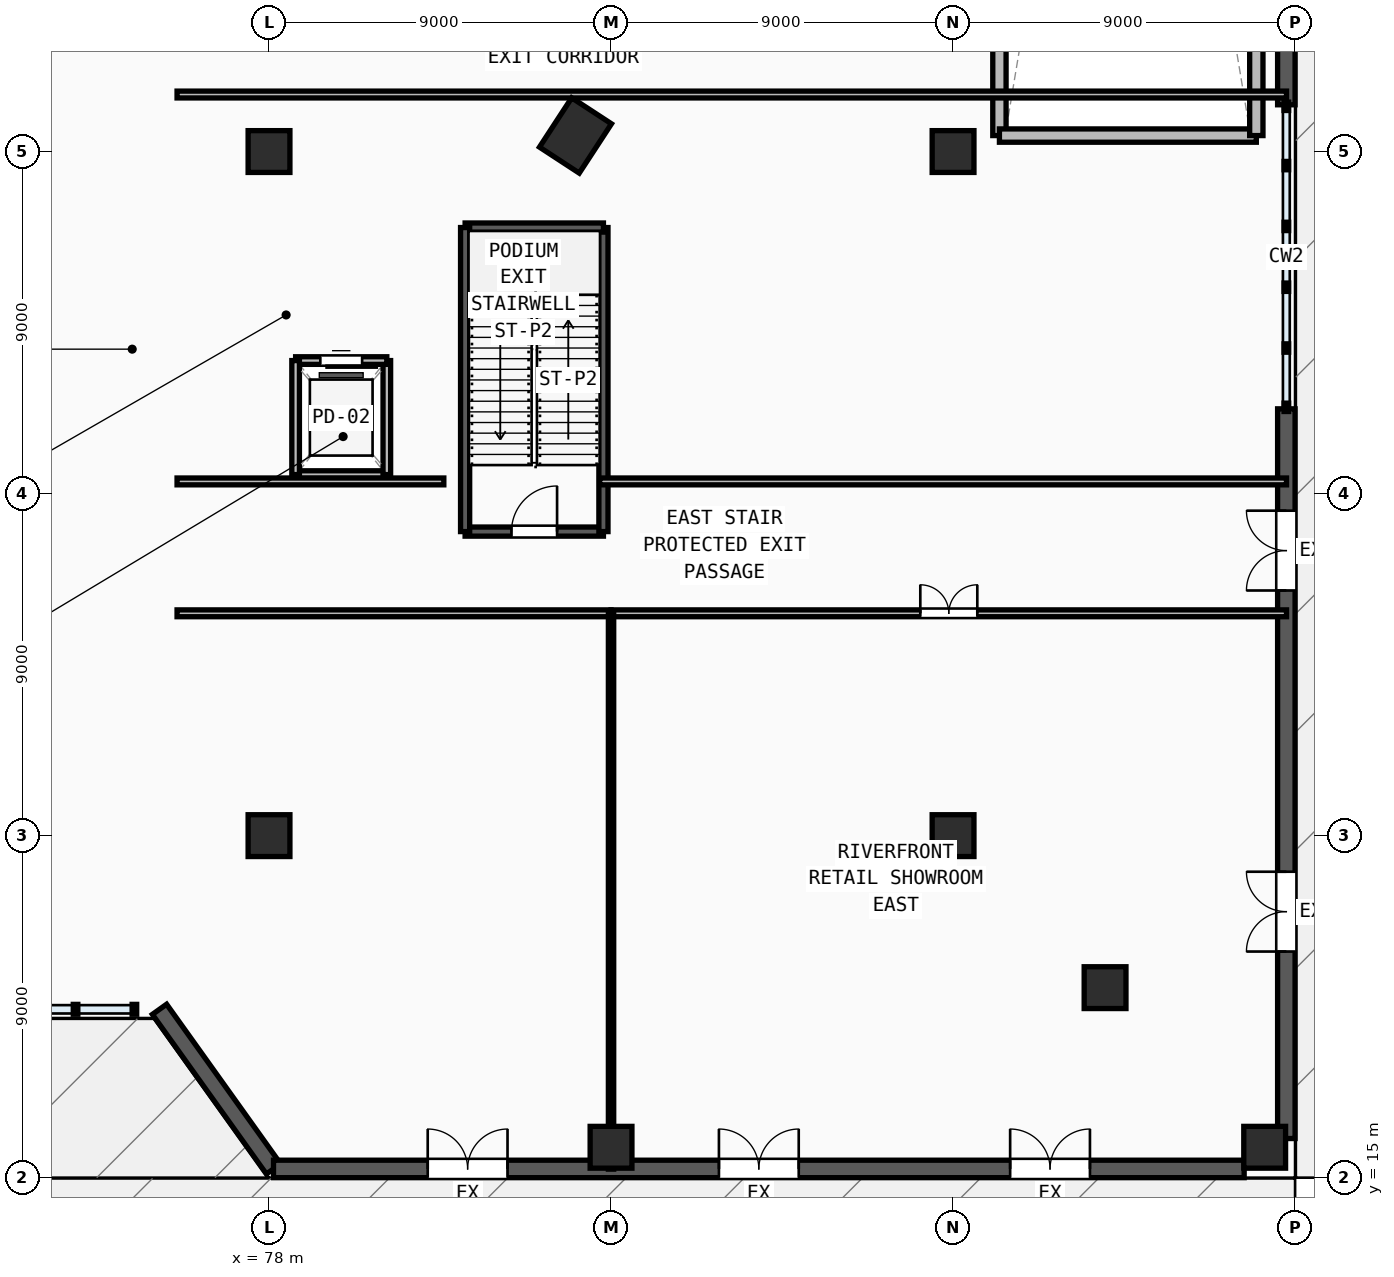
"""IFC4 building model, lengths in metres.
Left out: names, types, materials, properties, quantities, classifications, styles, units other than length and angle.
Written with IfcOpenShell. Run it as: python <this file> out.ifc"""

import sys

from ifc_helpers import new_model, si_unit, direction, frame, frame_2d, origin, origin_2d, place, context, subcontext, project, spatial, rectangle, extrude, source, transform, mapped, element, fill, save


model = new_model("IFC4")
c1 = context("Model", 3, precision=1e-05, world=origin(), true_north=direction((0.0, 1.0)))
c2 = subcontext(c1, "Body", "Model", "MODEL_VIEW")
j1 = project(units=[si_unit("LENGTHUNIT", "METRE"), si_unit("PLANEANGLEUNIT", "RADIAN")], contexts=[c1])
p1 = place(None, origin())
s1 = spatial("IfcSite", under=j1, at=p1, CompositionType="ELEMENT")
p2 = place(p1, origin())
s2 = spatial("IfcBuilding", under=s1, at=p2, CompositionType="ELEMENT")
p3 = place(p2, origin())
s3 = spatial("IfcBuildingStorey", under=s2, at=p3, CompositionType="ELEMENT", Elevation=0.0)
m1 = source(origin(), c2, "Body", "SweptSolid", [
    extrude(rectangle(XDim=1.55, YDim=1.25, at=origin_2d()), origin(), (0.0, 0.0, 1.0), 5.4),
])
p4 = place(p3, frame((86.064, 42.423, 0.0), z_axis=(0.0, 0.0, 1.0), x_axis=(0.546978918409, 0.837146380758, 0.0)))
e1 = element("IfcColumn", 1, at=p4, inside=s3, PredefinedType="COLUMN", context=c2, shape_type="MappedRepresentation", body=[
    mapped(m1, transform((0.0, 0.0, 0.0), x_axis=(1.0, 0.0, 0.0), y_axis=(0.0, 1.0, 0.0), z_axis=(0.0, 0.0, 1.0), scale=1.0)),
])
m2 = source(origin(), c2, "Body", "SweptSolid", [
    extrude(rectangle(XDim=1.1, YDim=1.1, at=origin_2d()), origin(), (0.0, 0.0, 1.0), 5.4),
])
for number, where, z_axis, x_axis in (
    (2, (78.0, 24.0, 0.0), (0.0, 0.0, 1.0), (1.0, 0.0, 0.0)),
    (3, (96.0, 24.0, 0.0), (0.0, 0.0, 1.0), (1.0, 0.0, 0.0)),
    (4, (78.0, 42.0, 0.0), (0.0, 0.0, 1.0), (1.0, 0.0, 0.0)),
    (5, (96.0, 42.0, 0.0), (0.0, 0.0, 1.0), (1.0, 0.0, 0.0)),
    (6, (87.0, 15.8, 0.0), (0.0, 0.0, 1.0), (1.0, 0.0, 0.0)),
    (7, (104.2, 15.8, 0.0), (0.0, 0.0, 1.0), (1.0, 0.0, 0.0)),
    (8, (100.0, 20.0, 0.0), (0.0, 0.0, 1.0), (1.0, 0.0, 0.0)),
):
    element("IfcColumn", number, at=place(p3, frame(where, z_axis=z_axis, x_axis=x_axis)), inside=s3, PredefinedType="COLUMN", context=c2, shape_type="MappedRepresentation", body=[
        mapped(m2, transform((0.0, 0.0, 0.0), x_axis=(1.0, 0.0, 0.0), y_axis=(0.0, 1.0, 0.0), z_axis=(0.0, 0.0, 1.0), scale=1.0)),
    ])
p5 = place(p3, frame((75.118, 19.43, 0.0), z_axis=(0.0, 0.0, 1.0), x_axis=(0.581242668191, -0.813730275137, 0.0)))
e9 = element("IfcWall", 9, at=p5, inside=s3, PredefinedType="SOLIDWALL", context=c2, shape_type="SweptSolid", body=[
    extrude(rectangle(XDim=5.161, YDim=0.46, at=frame_2d((2.581, 0.0))), origin(), (0.0, 0.0, 1.0), 5.15),
])
p6 = place(p3, frame((78.118, 15.23, 0.0), z_axis=(0.0, 0.0, 1.0), x_axis=(1.0, 0.0, 0.0)))
e10 = element("IfcWall", 10, at=p6, inside=s3, PredefinedType="SOLIDWALL", context=c2, shape_type="SweptSolid", body=[
    extrude(rectangle(XDim=25.542, YDim=0.46, at=frame_2d((12.771, 0.0))), origin(), (0.0, 0.0, 1.0), 5.15),
])
m3 = source(origin(), c2, "Body", "SweptSolid", [
    extrude(rectangle(XDim=2.1, YDim=2.4, at=frame_2d((1.05, 1.2))), frame((0.0, 0.24, 0.0), z_axis=(0.0, -1.0, 0.0), x_axis=(1.0, 0.0, 0.0)), (0.0, 0.0, 1.0), 0.48),
])
p7 = place(p6, frame((4.058, 0.0, 0.0)))
e11 = element("IfcOpeningElement", 11, at=p7, cuts=e10, PredefinedType="OPENING", context=c2, shape_type="MappedRepresentation", body=[
    mapped(m3, transform((0.0, 0.0, 0.0), x_axis=(1.0, 0.0, 0.0), y_axis=(0.0, 1.0, 0.0), z_axis=(0.0, 0.0, 1.0), scale=1.0)),
])
p8 = place(p6, frame((11.721, 0.0, 0.0)))
e12 = element("IfcOpeningElement", 12, at=p8, cuts=e10, PredefinedType="OPENING", context=c2, shape_type="MappedRepresentation", body=[
    mapped(m3, transform((0.0, 0.0, 0.0), x_axis=(1.0, 0.0, 0.0), y_axis=(0.0, 1.0, 0.0), z_axis=(0.0, 0.0, 1.0), scale=1.0)),
])
p9 = place(p6, frame((19.384, 0.0, 0.0)))
e13 = element("IfcOpeningElement", 13, at=p9, cuts=e10, PredefinedType="OPENING", context=c2, shape_type="MappedRepresentation", body=[
    mapped(m3, transform((0.0, 0.0, 0.0), x_axis=(1.0, 0.0, 0.0), y_axis=(0.0, 1.0, 0.0), z_axis=(0.0, 0.0, 1.0), scale=1.0)),
])
p10 = place(p3, frame((104.77, 16.03, 0.0), z_axis=(0.0, 0.0, 1.0), x_axis=(0.0, 1.0, 0.0)))
e14 = element("IfcWall", 14, at=p10, inside=s3, PredefinedType="SOLIDWALL", context=c2, shape_type="SweptSolid", body=[
    extrude(rectangle(XDim=19.2, YDim=0.46, at=frame_2d((9.6, 0.0))), origin(), (0.0, 0.0, 1.0), 5.15),
])
p11 = place(p10, frame((4.92, 0.0, 0.0)))
e15 = element("IfcOpeningElement", 15, at=p11, cuts=e14, PredefinedType="OPENING", context=c2, shape_type="MappedRepresentation", body=[
    mapped(m3, transform((0.0, 0.0, 0.0), x_axis=(1.0, 0.0, 0.0), y_axis=(0.0, 1.0, 0.0), z_axis=(0.0, 0.0, 1.0), scale=1.0)),
])
p12 = place(p10, frame((14.42, 0.0, 0.0)))
e16 = element("IfcOpeningElement", 16, at=p12, cuts=e14, PredefinedType="OPENING", context=c2, shape_type="MappedRepresentation", body=[
    mapped(m3, transform((0.0, 0.0, 0.0), x_axis=(1.0, 0.0, 0.0), y_axis=(0.0, 1.0, 0.0), z_axis=(0.0, 0.0, 1.0), scale=1.0)),
])
p13 = place(p3, frame((104.77, 43.23, 0.0), z_axis=(0.0, 0.0, 1.0), x_axis=(0.0, 1.0, 0.0)))
e17 = element("IfcWall", 17, at=p13, inside=s3, PredefinedType="SOLIDWALL", context=c2, shape_type="SweptSolid", body=[
    extrude(rectangle(XDim=42.74, YDim=0.46, at=frame_2d((21.37, 0.0))), origin(), (0.0, 0.0, 1.0), 5.15),
])
m4 = source(origin(), c2, "Body", "SweptSolid", [
    extrude(rectangle(XDim=4.0, YDim=3.8, at=frame_2d((2.0, 1.9))), frame((0.0, 0.24, 0.0), z_axis=(0.0, -1.0, 0.0), x_axis=(1.0, 0.0, 0.0)), (0.0, 0.0, 1.0), 0.48),
])
p14 = place(p13, frame((13.23, 0.0, 0.0)))
e18 = element("IfcOpeningElement", 18, at=p14, cuts=e17, PredefinedType="OPENING", context=c2, shape_type="MappedRepresentation", body=[
    mapped(m4, transform((0.0, 0.0, 0.0), x_axis=(1.0, 0.0, 0.0), y_axis=(0.0, 1.0, 0.0), z_axis=(0.0, 0.0, 1.0), scale=1.0)),
])
p15 = place(p3, frame((97.22, 42.42, 0.0), z_axis=(0.0, 0.0, 1.0), x_axis=(0.0, 1.0, 0.0)))
e19 = element("IfcWall", 19, at=p15, inside=s3, PredefinedType="SOLIDWALL", context=c2, shape_type="SweptSolid", body=[
    extrude(rectangle(XDim=43.98, YDim=0.35, at=frame_2d((21.99, 0.0))), origin(), (0.0, 0.0, 1.0), 5.15),
])
p16 = place(p3, frame((97.22, 42.42, 0.0), z_axis=(0.0, 0.0, 1.0), x_axis=(1.0, 0.0, 0.0)))
e20 = element("IfcWall", 20, at=p16, inside=s3, PredefinedType="SOLIDWALL", context=c2, shape_type="SweptSolid", body=[
    extrude(rectangle(XDim=6.76, YDim=0.35, at=frame_2d((3.38, 0.0))), origin(), (0.0, 0.0, 1.0), 5.15),
])
p17 = place(p3, frame((103.98, 42.42, 0.0), z_axis=(0.0, 0.0, 1.0), x_axis=(0.0, 1.0, 0.0)))
e21 = element("IfcWall", 21, at=p17, inside=s3, PredefinedType="SOLIDWALL", context=c2, shape_type="SweptSolid", body=[
    extrude(rectangle(XDim=43.98, YDim=0.35, at=frame_2d((21.99, 0.0))), origin(), (0.0, 0.0, 1.0), 5.15),
])
p18 = place(p3, frame((83.16, 32.0, 0.0), z_axis=(0.0, 0.0, 1.0), x_axis=(1.0, 0.0, 0.0)))
e22 = element("IfcWall", 22, at=p18, inside=s3, PredefinedType="SOLIDWALL", context=c2, shape_type="SweptSolid", body=[
    extrude(rectangle(XDim=3.64, YDim=0.24, at=frame_2d((1.82, 0.0))), origin(), (0.0, 0.0, 1.0), 5.15),
])
m5 = source(origin(), c2, "Body", "SweptSolid", [
    extrude(rectangle(XDim=1.2, YDim=2.2, at=frame_2d((0.6, 1.1))), frame((0.0, 0.13, 0.0), z_axis=(0.0, -1.0, 0.0), x_axis=(1.0, 0.0, 0.0)), (0.0, 0.0, 1.0), 0.26),
])
p19 = place(p18, frame((1.22, 0.0, 0.0)))
e23 = element("IfcOpeningElement", 23, at=p19, cuts=e22, PredefinedType="OPENING", context=c2, shape_type="MappedRepresentation", body=[
    mapped(m5, transform((0.0, 0.0, 0.0), x_axis=(1.0, 0.0, 0.0), y_axis=(0.0, 1.0, 0.0), z_axis=(0.0, 0.0, 1.0), scale=1.0)),
])
p20 = place(p3, frame((86.8, 32.0, 0.0), z_axis=(0.0, 0.0, 1.0), x_axis=(0.0, 1.0, 0.0)))
e24 = element("IfcWall", 24, at=p20, inside=s3, PredefinedType="SOLIDWALL", context=c2, shape_type="SweptSolid", body=[
    extrude(rectangle(XDim=8.0, YDim=0.24, at=frame_2d((4.0, 0.0))), origin(), (0.0, 0.0, 1.0), 5.15),
])
p21 = place(p3, frame((86.8, 40.0, 0.0), z_axis=(0.0, 0.0, 1.0), x_axis=(-1.0, 0.0, 0.0)))
e25 = element("IfcWall", 25, at=p21, inside=s3, PredefinedType="SOLIDWALL", context=c2, shape_type="SweptSolid", body=[
    extrude(rectangle(XDim=3.64, YDim=0.24, at=frame_2d((1.82, 0.0))), origin(), (0.0, 0.0, 1.0), 5.15),
])
p22 = place(p3, frame((83.16, 40.0, 0.0), z_axis=(0.0, 0.0, 1.0), x_axis=(0.0, -1.0, 0.0)))
e26 = element("IfcWall", 26, at=p22, inside=s3, PredefinedType="SOLIDWALL", context=c2, shape_type="SweptSolid", body=[
    extrude(rectangle(XDim=8.0, YDim=0.24, at=frame_2d((4.0, 0.0))), origin(), (0.0, 0.0, 1.0), 5.15),
])
p23 = place(p3, frame((78.7, 33.5, 0.0), z_axis=(0.0, 0.0, 1.0), x_axis=(1.0, 0.0, 0.0)))
e27 = element("IfcWall", 27, at=p23, inside=s3, PredefinedType="SOLIDWALL", context=c2, shape_type="SweptSolid", body=[
    extrude(rectangle(XDim=2.4, YDim=0.2, at=frame_2d((1.2, 0.0))), origin(), (0.0, 0.0, 1.0), 5.15),
])
p24 = place(p3, frame((81.1, 33.5, 0.0), z_axis=(0.0, 0.0, 1.0), x_axis=(0.0, 1.0, 0.0)))
e28 = element("IfcWall", 28, at=p24, inside=s3, PredefinedType="SOLIDWALL", context=c2, shape_type="SweptSolid", body=[
    extrude(rectangle(XDim=3.0, YDim=0.2, at=frame_2d((1.5, 0.0))), origin(), (0.0, 0.0, 1.0), 5.15),
])
p25 = place(p3, frame((81.1, 36.5, 0.0), z_axis=(0.0, 0.0, 1.0), x_axis=(-1.0, 0.0, 0.0)))
e29 = element("IfcWall", 29, at=p25, inside=s3, PredefinedType="SOLIDWALL", context=c2, shape_type="SweptSolid", body=[
    extrude(rectangle(XDim=2.4, YDim=0.2, at=frame_2d((1.2, 0.0))), origin(), (0.0, 0.0, 1.0), 5.15),
])
m6 = source(origin(), c2, "Body", "SweptSolid", [
    extrude(rectangle(XDim=1.1, YDim=2.2, at=frame_2d((0.55, 1.1))), frame((0.0, 0.11, 0.0), z_axis=(0.0, -1.0, 0.0), x_axis=(1.0, 0.0, 0.0)), (0.0, 0.0, 1.0), 0.22),
])
p26 = place(p25, frame((0.65, 0.0, 0.0)))
e30 = element("IfcOpeningElement", 30, at=p26, cuts=e29, PredefinedType="OPENING", context=c2, shape_type="MappedRepresentation", body=[
    mapped(m6, transform((0.0, 0.0, 0.0), x_axis=(1.0, 0.0, 0.0), y_axis=(0.0, 1.0, 0.0), z_axis=(0.0, 0.0, 1.0), scale=1.0)),
])
p27 = place(p3, frame((78.7, 36.5, 0.0), z_axis=(0.0, 0.0, 1.0), x_axis=(0.0, -1.0, 0.0)))
e31 = element("IfcWall", 31, at=p27, inside=s3, PredefinedType="SOLIDWALL", context=c2, shape_type="SweptSolid", body=[
    extrude(rectangle(XDim=3.0, YDim=0.2, at=frame_2d((1.5, 0.0))), origin(), (0.0, 0.0, 1.0), 5.15),
])
p28 = place(p3, frame((87.0, 29.85, 0.0), z_axis=(0.0, 0.0, 1.0), x_axis=(1.0, 0.0, 0.0)))
e32 = element("IfcWall", 32, at=p28, inside=s3, PredefinedType="PARTITIONING", context=c2, shape_type="SweptSolid", body=[
    extrude(rectangle(XDim=17.775, YDim=0.18, at=frame_2d((8.887, 0.0))), origin(), (0.0, 0.0, 1.0), 5.15),
])
m7 = source(origin(), c2, "Body", "SweptSolid", [
    extrude(rectangle(XDim=1.5, YDim=2.2, at=frame_2d((0.75, 1.1))), frame((0.0, 0.1, 0.0), z_axis=(0.0, -1.0, 0.0), x_axis=(1.0, 0.0, 0.0)), (0.0, 0.0, 1.0), 0.2),
])
p29 = place(p28, frame((8.138, 0.0, 0.0)))
e33 = element("IfcOpeningElement", 33, at=p29, cuts=e32, PredefinedType="OPENING", context=c2, shape_type="MappedRepresentation", body=[
    mapped(m7, transform((0.0, 0.0, 0.0), x_axis=(1.0, 0.0, 0.0), y_axis=(0.0, 1.0, 0.0), z_axis=(0.0, 0.0, 1.0), scale=1.0)),
])
p30 = place(p3, frame((75.58, 43.5, 0.0), z_axis=(0.0, 0.0, 1.0), x_axis=(1.0, 0.0, 0.0)))
e34 = element("IfcWall", 34, at=p30, inside=s3, PredefinedType="PARTITIONING", context=c2, shape_type="SweptSolid", body=[
    extrude(rectangle(XDim=29.195, YDim=0.18, at=frame_2d((14.597, 0.0))), origin(), (0.0, 0.0, 1.0), 4.585),
])
p31 = place(p3, frame((75.58, 29.85, 0.0), z_axis=(0.0, 0.0, 1.0), x_axis=(1.0, 0.0, 0.0)))
e35 = element("IfcWall", 35, at=p31, inside=s3, PredefinedType="PARTITIONING", context=c2, shape_type="SweptSolid", body=[
    extrude(rectangle(XDim=11.42, YDim=0.18, at=frame_2d((5.71, 0.0))), origin(), (0.0, 0.0, 1.0), 5.15),
])
p32 = place(p3, frame((75.58, 33.32, 0.0), z_axis=(0.0, 0.0, 1.0), x_axis=(1.0, 0.0, 0.0)))
e36 = element("IfcWall", 36, at=p32, inside=s3, PredefinedType="PARTITIONING", context=c2, shape_type="SweptSolid", body=[
    extrude(rectangle(XDim=7.02, YDim=0.18, at=frame_2d((3.51, 0.0))), origin(), (0.0, 0.0, 1.0), 5.15),
])
p33 = place(p3, frame((86.7, 33.32, 0.0), z_axis=(0.0, 0.0, 1.0), x_axis=(1.0, 0.0, 0.0)))
e37 = element("IfcWall", 37, at=p33, inside=s3, PredefinedType="PARTITIONING", context=c2, shape_type="SweptSolid", body=[
    extrude(rectangle(XDim=18.075, YDim=0.18, at=frame_2d((9.038, 0.0))), origin(), (0.0, 0.0, 1.0), 5.15),
])
p34 = place(p3, frame((87.0, 15.225, 0.0), z_axis=(0.0, 0.0, 1.0), x_axis=(0.0, 1.0, 0.0)))
e38 = element("IfcWall", 38, at=p34, inside=s3, PredefinedType="PARTITIONING", context=c2, shape_type="SweptSolid", body=[
    extrude(rectangle(XDim=14.625, YDim=0.14, at=frame_2d((7.312, 0.0))), origin(), (0.0, 0.0, 1.0), 5.15),
])
m8 = source(origin(), c2, "Body", "SweptSolid", [
    extrude(rectangle(XDim=2.1, YDim=2.4, at=frame_2d((1.05, 1.2))), frame((0.0, 0.025, 0.0), z_axis=(0.0, -1.0, 0.0), x_axis=(1.0, 0.0, 0.0)), (0.0, 0.0, 1.0), 0.05),
])
p35 = place(p7, frame((2.1, 0.0, 0.0), z_axis=(0.0, 0.0, 1.0), x_axis=(-1.0, 0.0, 0.0)))
e39 = element("IfcDoor", 39, at=p35, inside=s3, OperationType="DOUBLE_DOOR_SINGLE_SWING", PredefinedType="DOOR", context=c2, shape_type="MappedRepresentation", body=[
    mapped(m8, transform((0.0, 0.0, 0.0), x_axis=(1.0, 0.0, 0.0), y_axis=(0.0, 1.0, 0.0), z_axis=(0.0, 0.0, 1.0), scale=1.0)),
])
fill(e11, e39)
p36 = place(p8, frame((2.1, 0.0, 0.0), z_axis=(0.0, 0.0, 1.0), x_axis=(-1.0, 0.0, 0.0)))
e40 = element("IfcDoor", 40, at=p36, inside=s3, OperationType="DOUBLE_DOOR_SINGLE_SWING", PredefinedType="DOOR", context=c2, shape_type="MappedRepresentation", body=[
    mapped(m8, transform((0.0, 0.0, 0.0), x_axis=(1.0, 0.0, 0.0), y_axis=(0.0, 1.0, 0.0), z_axis=(0.0, 0.0, 1.0), scale=1.0)),
])
fill(e12, e40)
p37 = place(p9, frame((2.1, 0.0, 0.0), z_axis=(0.0, 0.0, 1.0), x_axis=(-1.0, 0.0, 0.0)))
e41 = element("IfcDoor", 41, at=p37, inside=s3, OperationType="DOUBLE_DOOR_SINGLE_SWING", PredefinedType="DOOR", context=c2, shape_type="MappedRepresentation", body=[
    mapped(m8, transform((0.0, 0.0, 0.0), x_axis=(1.0, 0.0, 0.0), y_axis=(0.0, 1.0, 0.0), z_axis=(0.0, 0.0, 1.0), scale=1.0)),
])
fill(e13, e41)
p38 = place(p11, frame((2.1, 0.0, 0.0), z_axis=(0.0, 0.0, 1.0), x_axis=(-1.0, 0.0, 0.0)))
e42 = element("IfcDoor", 42, at=p38, inside=s3, OperationType="DOUBLE_DOOR_SINGLE_SWING", PredefinedType="DOOR", context=c2, shape_type="MappedRepresentation", body=[
    mapped(m8, transform((0.0, 0.0, 0.0), x_axis=(1.0, 0.0, 0.0), y_axis=(0.0, 1.0, 0.0), z_axis=(0.0, 0.0, 1.0), scale=1.0)),
])
fill(e15, e42)
p39 = place(p12, frame((2.1, 0.0, 0.0), z_axis=(0.0, 0.0, 1.0), x_axis=(-1.0, 0.0, 0.0)))
e43 = element("IfcDoor", 43, at=p39, inside=s3, OperationType="DOUBLE_DOOR_SINGLE_SWING", PredefinedType="DOOR", context=c2, shape_type="MappedRepresentation", body=[
    mapped(m8, transform((0.0, 0.0, 0.0), x_axis=(1.0, 0.0, 0.0), y_axis=(0.0, 1.0, 0.0), z_axis=(0.0, 0.0, 1.0), scale=1.0)),
])
fill(e16, e43)
m9 = source(origin(), c2, "Body", "SweptSolid", [
    extrude(rectangle(XDim=1.2, YDim=2.2, at=frame_2d((0.6, 1.1))), frame((0.0, 0.025, 0.0), z_axis=(0.0, -1.0, 0.0), x_axis=(1.0, 0.0, 0.0)), (0.0, 0.0, 1.0), 0.05),
])
p40 = place(p19, origin())
e44 = element("IfcDoor", 44, at=p40, inside=s3, OperationType="SINGLE_SWING_RIGHT", PredefinedType="DOOR", context=c2, shape_type="MappedRepresentation", body=[
    mapped(m9, transform((0.0, 0.0, 0.0), x_axis=(1.0, 0.0, 0.0), y_axis=(0.0, 1.0, 0.0), z_axis=(0.0, 0.0, 1.0), scale=1.0)),
])
fill(e23, e44)
m10 = source(origin(), c2, "Body", "SweptSolid", [
    extrude(rectangle(XDim=1.1, YDim=2.2, at=frame_2d((0.55, 1.1))), frame((0.0, 0.025, 0.0), z_axis=(0.0, -1.0, 0.0), x_axis=(1.0, 0.0, 0.0)), (0.0, 0.0, 1.0), 0.05),
])
p41 = place(p26, origin())
e45 = element("IfcDoor", 45, at=p41, inside=s3, OperationType="SLIDING_TO_LEFT", PredefinedType="DOOR", context=c2, shape_type="MappedRepresentation", body=[
    mapped(m10, transform((0.0, 0.0, 0.0), x_axis=(1.0, 0.0, 0.0), y_axis=(0.0, 1.0, 0.0), z_axis=(0.0, 0.0, 1.0), scale=1.0)),
])
fill(e30, e45)
m11 = source(origin(), c2, "Body", "SweptSolid", [
    extrude(rectangle(XDim=1.5, YDim=2.2, at=frame_2d((0.75, 1.1))), frame((0.0, 0.025, 0.0), z_axis=(0.0, -1.0, 0.0), x_axis=(1.0, 0.0, 0.0)), (0.0, 0.0, 1.0), 0.05),
])
p42 = place(p29, origin())
e46 = element("IfcDoor", 46, at=p42, inside=s3, OperationType="DOUBLE_DOOR_SINGLE_SWING", PredefinedType="DOOR", context=c2, shape_type="MappedRepresentation", body=[
    mapped(m11, transform((0.0, 0.0, 0.0), x_axis=(1.0, 0.0, 0.0), y_axis=(0.0, 1.0, 0.0), z_axis=(0.0, 0.0, 1.0), scale=1.0)),
])
fill(e33, e46)
save(model, sys.argv[1])
